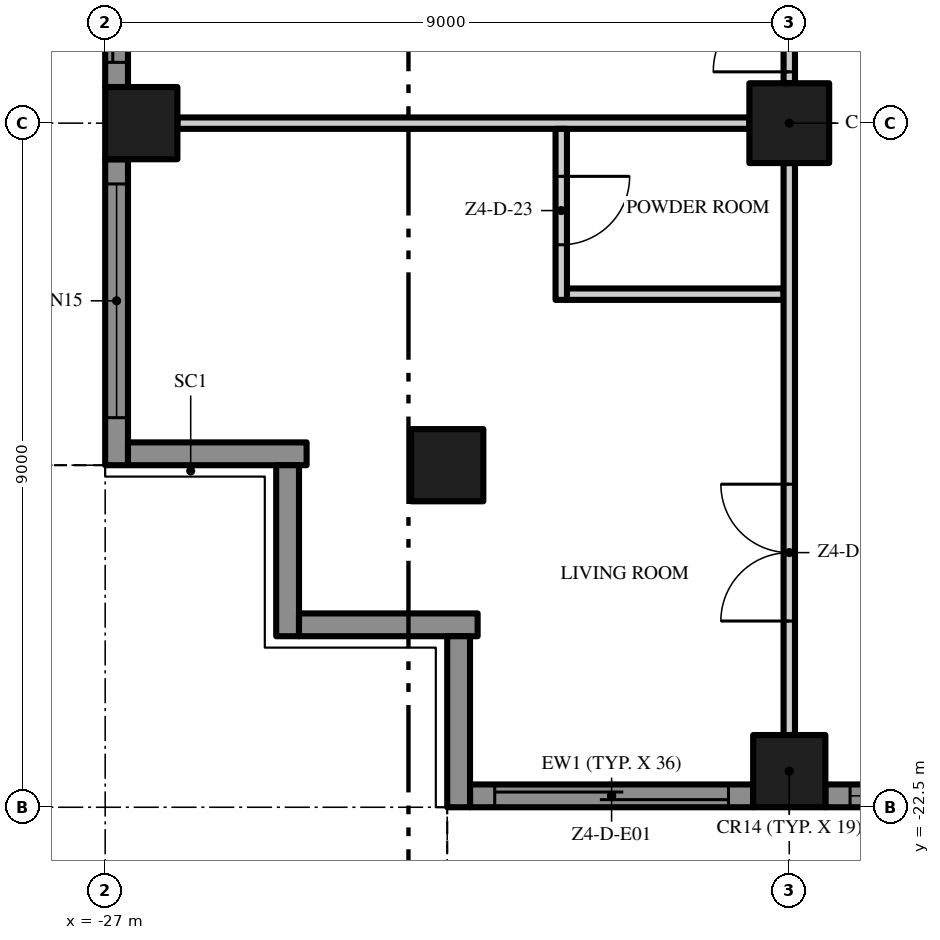
"""IFC4 building model, lengths in metres.
Left out: names, types, materials, properties, quantities, classifications, styles, units other than length and angle.
Written with IfcOpenShell. Run it as: python <this file> out.ifc"""

import sys

from ifc_helpers import new_model, si_unit, direction, frame, frame_2d, origin, origin_2d, place, context, subcontext, project, spatial, polyline, rectangle, outline, extrude, element, fill, save


model = new_model("IFC4")
c1 = context("Model", 3, precision=1e-05, world=origin(), true_north=direction((0.0, 1.0)))
c2 = subcontext(c1, "Body", "Model", "MODEL_VIEW")
j1 = project(units=[si_unit("LENGTHUNIT", "METRE"), si_unit("PLANEANGLEUNIT", "RADIAN")], contexts=[c1])
p1 = place(None, origin())
s1 = spatial("IfcSite", under=j1, at=p1, CompositionType="ELEMENT")
p2 = place(p1, origin())
s2 = spatial("IfcBuilding", under=s1, at=p2, CompositionType="ELEMENT")
p3 = place(p2, frame((0.0, 0.0, 218.6)))
s3 = spatial("IfcBuildingStorey", under=s2, at=p3, CompositionType="ELEMENT", Elevation=218.6)
p4 = place(p3, frame((-18.0, -13.5, 0.0), z_axis=(0.0, 0.0, 1.0), x_axis=(1.0, 0.0, 0.0)))
e1 = element("IfcColumn", 1, at=p4, inside=s3, PredefinedType="COLUMN", context=c2, shape_type="SweptSolid", body=[
    extrude(rectangle(XDim=1.05, YDim=1.05, at=origin_2d()), origin(), (0.0, 0.0, 1.0), 3.5),
])
for number, where, z_axis, x_axis in (
    (2, (-18.0, -22.025, 0.0), (0.0, 0.0, 1.0), (1.0, 0.0, 0.0)),
    (3, (-26.525, -13.5, 0.0), (0.0, 0.0, 1.0), (1.0, 0.0, 0.0)),
    (4, (-22.5, -18.0, 0.0), (0.0, 0.0, 1.0), (1.0, 0.0, 0.0)),
):
    element("IfcColumn", number, at=place(p3, frame(where, z_axis=z_axis, x_axis=x_axis)), inside=s3, PredefinedType="COLUMN", context=c2, shape_type="SweptSolid", body=[
        extrude(rectangle(XDim=0.95, YDim=0.95, at=origin_2d()), origin(), (0.0, 0.0, 1.0), 3.5),
    ])
p5 = place(p3, frame((-18.475, -22.35, 0.0), z_axis=(0.0, 0.0, 1.0), x_axis=(-1.0, 0.0, 0.0)))
e5 = element("IfcWall", 5, at=p5, inside=s3, PredefinedType="SOLIDWALL", context=c2, shape_type="SweptSolid", body=[
    extrude(rectangle(XDim=3.725, YDim=0.3, at=frame_2d((1.863, 0.0))), origin(), (0.0, 0.0, 1.0), 3.5),
])
p6 = place(p5, frame((0.325, 0.0, 0.0)))
e6 = element("IfcOpeningElement", 6, at=p6, cuts=e5, PredefinedType="OPENING", context=c2, shape_type="SweptSolid", body=[
    extrude(rectangle(XDim=3.075, YDim=2.4, at=frame_2d((1.538, 1.2))), frame((0.0, 0.16, 0.0), z_axis=(0.0, -1.0, 0.0), x_axis=(1.0, 0.0, 0.0)), (0.0, 0.0, 1.0), 0.32),
])
p7 = place(p3, frame((-9.475, -22.35, 0.0), z_axis=(0.0, 0.0, 1.0), x_axis=(-1.0, 0.0, 0.0)))
e7 = element("IfcWall", 7, at=p7, inside=s3, PredefinedType="SOLIDWALL", context=c2, shape_type="SweptSolid", body=[
    extrude(rectangle(XDim=8.05, YDim=0.3, at=frame_2d((4.025, 0.0))), origin(), (0.0, 0.0, 1.0), 3.5),
])
p8 = place(p7, frame((4.65, 0.0, 0.45)))
e8 = element("IfcOpeningElement", 8, at=p8, cuts=e7, PredefinedType="OPENING", context=c2, shape_type="SweptSolid", body=[
    extrude(rectangle(XDim=3.075, YDim=2.65, at=frame_2d((1.538, 1.325))), frame((0.0, 0.16, 0.0), z_axis=(0.0, -1.0, 0.0), x_axis=(1.0, 0.0, 0.0)), (0.0, 0.0, 1.0), 0.32),
])
p9 = place(p7, frame((0.325, 0.0, 0.45)))
e9 = element("IfcOpeningElement", 9, at=p9, cuts=e7, PredefinedType="OPENING", context=c2, shape_type="SweptSolid", body=[
    extrude(rectangle(XDim=3.075, YDim=2.65, at=frame_2d((1.538, 1.325))), frame((0.0, 0.16, 0.0), z_axis=(0.0, -1.0, 0.0), x_axis=(1.0, 0.0, 0.0)), (0.0, 0.0, 1.0), 0.32),
])
p10 = place(p3, frame((-26.85, -13.025, 0.0), z_axis=(0.0, 0.0, 1.0), x_axis=(0.0, 1.0, 0.0)))
e10 = element("IfcWall", 10, at=p10, inside=s3, PredefinedType="SOLIDWALL", context=c2, shape_type="SweptSolid", body=[
    extrude(rectangle(XDim=8.05, YDim=0.3, at=frame_2d((4.025, 0.0))), origin(), (0.0, 0.0, 1.0), 3.5),
])
p11 = place(p10, frame((4.65, 0.0, 0.45)))
e11 = element("IfcOpeningElement", 11, at=p11, cuts=e10, PredefinedType="OPENING", context=c2, shape_type="SweptSolid", body=[
    extrude(rectangle(XDim=3.075, YDim=2.65, at=frame_2d((1.538, 1.325))), frame((0.0, 0.16, 0.0), z_axis=(0.0, -1.0, 0.0), x_axis=(1.0, 0.0, 0.0)), (0.0, 0.0, 1.0), 0.32),
])
p12 = place(p10, frame((0.325, 0.0, 0.0)))
e12 = element("IfcOpeningElement", 12, at=p12, cuts=e10, PredefinedType="OPENING", context=c2, shape_type="SweptSolid", body=[
    extrude(rectangle(XDim=3.075, YDim=2.4, at=frame_2d((1.538, 1.2))), frame((0.0, 0.16, 0.0), z_axis=(0.0, -1.0, 0.0), x_axis=(1.0, 0.0, 0.0)), (0.0, 0.0, 1.0), 0.32),
])
p13 = place(p3, frame((-26.85, -18.0, 0.0), z_axis=(0.0, 0.0, 1.0), x_axis=(0.0, 1.0, 0.0)))
e13 = element("IfcWall", 13, at=p13, inside=s3, PredefinedType="SOLIDWALL", context=c2, shape_type="SweptSolid", body=[
    extrude(rectangle(XDim=4.025, YDim=0.3, at=frame_2d((2.013, 0.0))), origin(), (0.0, 0.0, 1.0), 3.5),
])
p14 = place(p13, frame((0.625, 0.0, 0.45)))
e14 = element("IfcOpeningElement", 14, at=p14, cuts=e13, PredefinedType="OPENING", context=c2, shape_type="SweptSolid", body=[
    extrude(rectangle(XDim=3.075, YDim=2.65, at=frame_2d((1.538, 1.325))), frame((0.0, 0.16, 0.0), z_axis=(0.0, -1.0, 0.0), x_axis=(1.0, 0.0, 0.0)), (0.0, 0.0, 1.0), 0.32),
])
p15 = place(p3, frame((-24.35, -17.85, 0.0), z_axis=(0.0, 0.0, 1.0), x_axis=(-1.0, 0.0, 0.0)))
e15 = element("IfcWall", 15, at=p15, inside=s3, PredefinedType="SOLIDWALL", context=c2, shape_type="SweptSolid", body=[
    extrude(rectangle(XDim=2.35, YDim=0.3, at=frame_2d((1.175, 0.0))), origin(), (0.0, 0.0, 1.0), 3.5),
])
p16 = place(p3, frame((-24.6, -20.25, 0.0), z_axis=(0.0, 0.0, 1.0), x_axis=(0.0, 1.0, 0.0)))
e16 = element("IfcWall", 16, at=p16, inside=s3, PredefinedType="SOLIDWALL", context=c2, shape_type="SweptSolid", body=[
    extrude(rectangle(XDim=2.25, YDim=0.3, at=frame_2d((1.125, 0.0))), origin(), (0.0, 0.0, 1.0), 3.5),
])
p17 = place(p3, frame((-22.1, -20.1, 0.0), z_axis=(0.0, 0.0, 1.0), x_axis=(-1.0, 0.0, 0.0)))
e17 = element("IfcWall", 17, at=p17, inside=s3, PredefinedType="SOLIDWALL", context=c2, shape_type="SweptSolid", body=[
    extrude(rectangle(XDim=2.35, YDim=0.3, at=frame_2d((1.175, 0.0))), origin(), (0.0, 0.0, 1.0), 3.5),
])
p18 = place(p3, frame((-22.35, -22.5, 0.0), z_axis=(0.0, 0.0, 1.0), x_axis=(0.0, 1.0, 0.0)))
e18 = element("IfcWall", 18, at=p18, inside=s3, PredefinedType="SOLIDWALL", context=c2, shape_type="SweptSolid", body=[
    extrude(rectangle(XDim=2.25, YDim=0.3, at=frame_2d((1.125, 0.0))), origin(), (0.0, 0.0, 1.0), 3.5),
])
p19 = place(p3, origin())
e19 = element("IfcWall", 19, at=p19, inside=s3, PredefinedType="USERDEFINED", context=c2, shape_type="SweptSolid", body=[
    extrude(outline(polyline([(-22.5, -25.5), (-21.0, -25.271), (-19.5, -24.671), (-18.0, -23.929), (-16.5, -23.329), (-15.0, -23.1), (-13.5, -23.329), (-12.0, -23.929), (-10.5, -24.671), (-9.0, -25.271), (-7.5, -25.5), (-6.0, -25.271), (-4.5, -24.671), (-3.0, -23.929), (-1.5, -23.329), (0.0, -23.1), (1.5, -23.329), (3.0, -23.929), (4.5, -24.671), (6.0, -25.271), (7.5, -25.5), (9.0, -25.271), (10.5, -24.671), (12.0, -23.929), (13.5, -23.329), (15.0, -23.1), (16.5, -23.329), (18.0, -23.929), (19.5, -24.671), (21.0, -25.271), (22.5, -25.5), (22.538, -25.253), (21.066, -25.028), (19.602, -24.442), (18.102, -23.701), (16.566, -23.086), (15.0, -22.847), (13.434, -23.086), (11.898, -23.701), (10.398, -24.442), (8.934, -25.028), (7.5, -25.247), (6.066, -25.028), (4.602, -24.442), (3.102, -23.701), (1.566, -23.086), (0.0, -22.847), (-1.566, -23.086), (-3.102, -23.701), (-4.602, -24.442), (-6.066, -25.028), (-7.5, -25.247), (-8.934, -25.028), (-10.398, -24.442), (-11.898, -23.701), (-13.434, -23.086), (-15.0, -22.847), (-16.566, -23.086), (-18.102, -23.701), (-19.602, -24.442), (-21.066, -25.028), (-22.538, -25.253), (-22.5, -25.5)])), origin(), (0.0, 0.0, 1.0), 0.9),
])
p20 = place(p3, origin())
e20 = element("IfcWall", 20, at=p20, inside=s3, PredefinedType="USERDEFINED", context=c2, shape_type="SweptSolid", body=[
    extrude(outline(polyline([(-30.0, 18.0), (-29.771, 16.5), (-29.171, 15.0), (-28.429, 13.5), (-27.829, 12.0), (-27.6, 10.5), (-27.829, 9.0), (-28.429, 7.5), (-29.171, 6.0), (-29.771, 4.5), (-30.0, 3.0), (-29.771, 1.5), (-29.171, 0.0), (-28.429, -1.5), (-27.829, -3.0), (-27.6, -4.5), (-27.829, -6.0), (-28.429, -7.5), (-29.171, -9.0), (-29.771, -10.5), (-30.0, -12.0), (-29.771, -13.5), (-29.171, -15.0), (-28.429, -16.5), (-27.829, -18.0), (-27.597, -17.907), (-28.201, -16.398), (-28.942, -14.898), (-29.528, -13.434), (-29.747, -12.0), (-29.528, -10.566), (-28.942, -9.102), (-28.201, -7.602), (-27.586, -6.066), (-27.347, -4.5), (-27.586, -2.934), (-28.201, -1.398), (-28.942, 0.102), (-29.528, 1.566), (-29.747, 3.0), (-29.528, 4.434), (-28.942, 5.898), (-28.201, 7.398), (-27.586, 8.934), (-27.347, 10.5), (-27.586, 12.066), (-28.201, 13.602), (-28.942, 15.102), (-29.528, 16.566), (-29.753, 18.038), (-30.0, 18.0)])), origin(), (0.0, 0.0, 1.0), 0.9),
])
p21 = place(p3, frame((-20.925, -15.75, 0.0), z_axis=(0.0, 0.0, 1.0), x_axis=(1.0, 0.0, 0.0)))
e21 = element("IfcWall", 21, at=p21, inside=s3, PredefinedType="PARTITIONING", context=c2, shape_type="SweptSolid", body=[
    extrude(rectangle(XDim=2.85, YDim=0.15, at=frame_2d((1.425, 0.0))), origin(), (0.0, 0.0, 1.0), 3.5),
])
p22 = place(p3, frame((-26.05, -13.5, 0.0), z_axis=(0.0, 0.0, 1.0), x_axis=(1.0, 0.0, 0.0)))
e22 = element("IfcWall", 22, at=p22, inside=s3, PredefinedType="PARTITIONING", context=c2, shape_type="SweptSolid", body=[
    extrude(rectangle(XDim=7.525, YDim=0.15, at=frame_2d((3.763, 0.0))), origin(), (0.0, 0.0, 1.0), 3.5),
])
p23 = place(p3, frame((-21.0, -13.575, 0.0), z_axis=(0.0, 0.0, 1.0), x_axis=(0.0, -1.0, 0.0)))
e23 = element("IfcWall", 23, at=p23, inside=s3, PredefinedType="PARTITIONING", context=c2, shape_type="SweptSolid", body=[
    extrude(rectangle(XDim=2.25, YDim=0.15, at=frame_2d((1.125, 0.0))), origin(), (0.0, 0.0, 1.0), 3.5),
])
p24 = place(p23, frame((0.625, 0.0, 0.0)))
e24 = element("IfcOpeningElement", 24, at=p24, cuts=e23, PredefinedType="OPENING", context=c2, shape_type="SweptSolid", body=[
    extrude(rectangle(XDim=0.9, YDim=2.1, at=frame_2d((0.45, 1.05))), frame((0.0, 0.085, 0.0), z_axis=(0.0, -1.0, 0.0), x_axis=(1.0, 0.0, 0.0)), (0.0, 0.0, 1.0), 0.17),
])
p25 = place(p3, frame((-18.0, -21.55, 0.0), z_axis=(0.0, 0.0, 1.0), x_axis=(0.0, 1.0, 0.0)))
e25 = element("IfcWall", 25, at=p25, inside=s3, PredefinedType="PARTITIONING", context=c2, shape_type="SweptSolid", body=[
    extrude(rectangle(XDim=7.525, YDim=0.15, at=frame_2d((3.763, 0.0))), origin(), (0.0, 0.0, 1.0), 3.5),
])
p26 = place(p25, frame((1.5, 0.0, 0.0)))
e26 = element("IfcOpeningElement", 26, at=p26, cuts=e25, PredefinedType="OPENING", context=c2, shape_type="SweptSolid", body=[
    extrude(rectangle(XDim=1.8, YDim=2.4, at=frame_2d((0.9, 1.2))), frame((0.0, 0.085, 0.0), z_axis=(0.0, -1.0, 0.0), x_axis=(1.0, 0.0, 0.0)), (0.0, 0.0, 1.0), 0.17),
])
p27 = place(p3, frame((-18.0, -12.975, 0.0), z_axis=(0.0, 0.0, 1.0), x_axis=(0.0, 1.0, 0.0)))
e27 = element("IfcWall", 27, at=p27, inside=s3, PredefinedType="PARTITIONING", context=c2, shape_type="SweptSolid", body=[
    extrude(rectangle(XDim=7.95, YDim=0.15, at=frame_2d((3.975, 0.0))), origin(), (0.0, 0.0, 1.0), 3.5),
])
p28 = place(p27, frame((0.15, 0.0, 0.0)))
e28 = element("IfcOpeningElement", 28, at=p28, cuts=e27, PredefinedType="OPENING", context=c2, shape_type="SweptSolid", body=[
    extrude(rectangle(XDim=1.0, YDim=2.4, at=frame_2d((0.5, 1.2))), frame((0.0, 0.085, 0.0), z_axis=(0.0, -1.0, 0.0), x_axis=(1.0, 0.0, 0.0)), (0.0, 0.0, 1.0), 0.17),
])
p29 = place(p27, frame((6.8, 0.0, 0.0)))
e29 = element("IfcOpeningElement", 29, at=p29, cuts=e27, PredefinedType="OPENING", context=c2, shape_type="SweptSolid", body=[
    extrude(rectangle(XDim=1.0, YDim=2.4, at=frame_2d((0.5, 1.2))), frame((0.0, 0.085, 0.0), z_axis=(0.0, -1.0, 0.0), x_axis=(1.0, 0.0, 0.0)), (0.0, 0.0, 1.0), 0.17),
])
p30 = place(p6, origin())
e30 = element("IfcDoor", 30, at=p30, inside=s3, OperationType="SINGLE_SWING_LEFT", PredefinedType="DOOR", context=c2, shape_type="SweptSolid", body=[
    extrude(rectangle(XDim=3.075, YDim=2.4, at=frame_2d((1.538, 1.2))), frame((0.0, 0.025, 0.0), z_axis=(0.0, -1.0, 0.0), x_axis=(1.0, 0.0, 0.0)), (0.0, 0.0, 1.0), 0.05),
])
fill(e6, e30)
p31 = place(p8, origin())
e31 = element("IfcWindow", 31, at=p31, inside=s3, PartitioningType="SINGLE_PANEL", PredefinedType="WINDOW", context=c2, shape_type="SweptSolid", body=[
    extrude(rectangle(XDim=3.075, YDim=2.65, at=frame_2d((1.538, 1.325))), frame((0.0, 0.03, 0.0), z_axis=(0.0, -1.0, 0.0), x_axis=(1.0, 0.0, 0.0)), (0.0, 0.0, 1.0), 0.06),
])
fill(e8, e31)
p32 = place(p12, origin())
e32 = element("IfcDoor", 32, at=p32, inside=s3, OperationType="SINGLE_SWING_LEFT", PredefinedType="DOOR", context=c2, shape_type="SweptSolid", body=[
    extrude(rectangle(XDim=3.075, YDim=2.4, at=frame_2d((1.538, 1.2))), frame((0.0, 0.025, 0.0), z_axis=(0.0, -1.0, 0.0), x_axis=(1.0, 0.0, 0.0)), (0.0, 0.0, 1.0), 0.05),
])
fill(e12, e32)
p33 = place(p14, origin())
e33 = element("IfcWindow", 33, at=p33, inside=s3, PartitioningType="SINGLE_PANEL", PredefinedType="WINDOW", context=c2, shape_type="SweptSolid", body=[
    extrude(rectangle(XDim=3.075, YDim=2.65, at=frame_2d((1.538, 1.325))), frame((0.0, 0.03, 0.0), z_axis=(0.0, -1.0, 0.0), x_axis=(1.0, 0.0, 0.0)), (0.0, 0.0, 1.0), 0.06),
])
fill(e14, e33)
p34 = place(p26, origin())
e34 = element("IfcDoor", 34, at=p34, inside=s3, OperationType="DOUBLE_DOOR_SINGLE_SWING", PredefinedType="DOOR", context=c2, shape_type="SweptSolid", body=[
    extrude(rectangle(XDim=1.8, YDim=2.4, at=frame_2d((0.9, 1.2))), frame((0.0, 0.025, 0.0), z_axis=(0.0, -1.0, 0.0), x_axis=(1.0, 0.0, 0.0)), (0.0, 0.0, 1.0), 0.05),
])
fill(e26, e34)
p35 = place(p24, origin())
e35 = element("IfcDoor", 35, at=p35, inside=s3, OperationType="SINGLE_SWING_LEFT", PredefinedType="DOOR", context=c2, shape_type="SweptSolid", body=[
    extrude(rectangle(XDim=0.9, YDim=2.1, at=frame_2d((0.45, 1.05))), frame((0.0, 0.025, 0.0), z_axis=(0.0, -1.0, 0.0), x_axis=(1.0, 0.0, 0.0)), (0.0, 0.0, 1.0), 0.05),
])
fill(e24, e35)
p36 = place(p28, origin())
e36 = element("IfcDoor", 36, at=p36, inside=s3, OperationType="SINGLE_SWING_LEFT", PredefinedType="DOOR", context=c2, shape_type="SweptSolid", body=[
    extrude(rectangle(XDim=1.0, YDim=2.4, at=frame_2d((0.5, 1.2))), frame((0.0, 0.025, 0.0), z_axis=(0.0, -1.0, 0.0), x_axis=(1.0, 0.0, 0.0)), (0.0, 0.0, 1.0), 0.05),
])
fill(e28, e36)
save(model, sys.argv[1])
